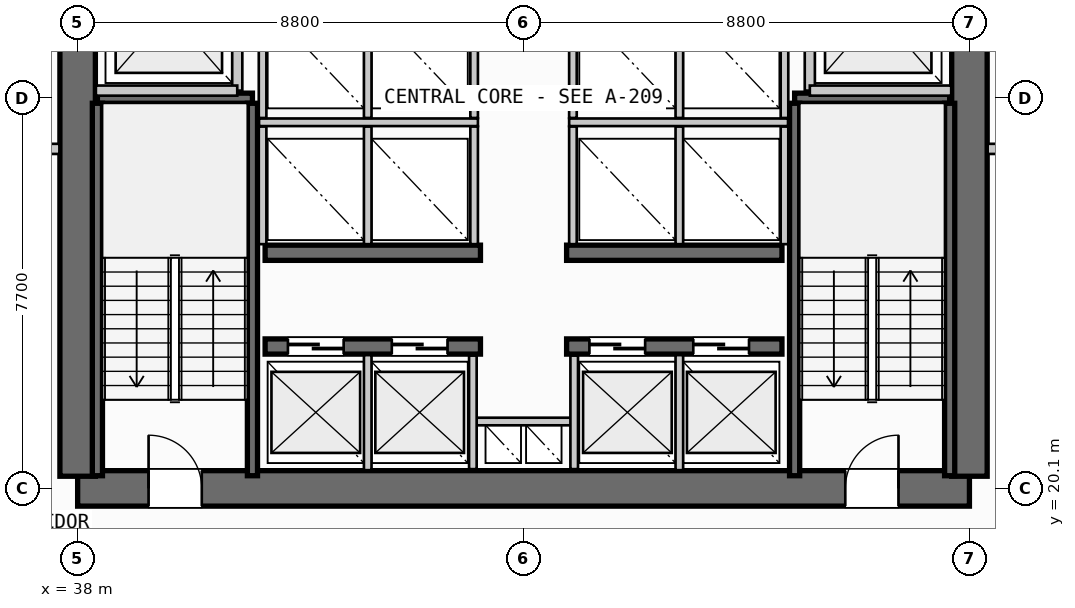
"""IFC4 building model, lengths in metres.
Left out: names, types, materials, properties, quantities, classifications, styles, units other than length and angle.
Written with IfcOpenShell. Run it as: python <this file> out.ifc"""

import sys

from ifc_helpers import new_model, si_unit, direction, frame, frame_2d, origin, place, context, subcontext, project, spatial, rectangle, extrude, source, transform, mapped, element, fill, save


model = new_model("IFC4")
c1 = context("Model", 3, precision=1e-05, world=origin(), true_north=direction((0.0, 1.0)))
c2 = subcontext(c1, "Body", "Model", "MODEL_VIEW")
j1 = project(units=[si_unit("LENGTHUNIT", "METRE"), si_unit("PLANEANGLEUNIT", "RADIAN")], contexts=[c1])
p1 = place(None, origin())
s1 = spatial("IfcSite", under=j1, at=p1, CompositionType="ELEMENT")
p2 = place(p1, origin())
s2 = spatial("IfcBuilding", under=s1, at=p2, CompositionType="ELEMENT")
p3 = place(p2, frame((0.0, 0.0, 60.0)))
s3 = spatial("IfcBuildingStorey", under=s2, at=p3, CompositionType="ELEMENT", Elevation=60.0)
p4 = place(p3, frame((38.0, 20.1, 0.0), z_axis=(0.0, 0.0, 1.0), x_axis=(1.0, 0.0, 0.0)))
e1 = element("IfcWall", 1, at=p4, inside=s3, PredefinedType="SHEAR", context=c2, shape_type="SweptSolid", body=[
    extrude(rectangle(XDim=17.6, YDim=0.7, at=frame_2d((8.8, 0.0))), origin(), (0.0, 0.0, 1.0), 3.55),
])
p5 = place(p4, frame((1.4, 0.0, 0.0)))
e2 = element("IfcOpeningElement", 2, at=p5, cuts=e1, PredefinedType="OPENING", context=c2, shape_type="SweptSolid", body=[
    extrude(rectangle(XDim=1.05, YDim=2.15, at=frame_2d((0.525, 1.075))), frame((0.0, 0.36, 0.0), z_axis=(0.0, -1.0, 0.0), x_axis=(1.0, 0.0, 0.0)), (0.0, 0.0, 1.0), 0.72),
])
p6 = place(p4, frame((15.15, 0.0, 0.0)))
e3 = element("IfcOpeningElement", 3, at=p6, cuts=e1, PredefinedType="OPENING", context=c2, shape_type="SweptSolid", body=[
    extrude(rectangle(XDim=1.05, YDim=2.15, at=frame_2d((0.525, 1.075))), frame((0.0, 0.36, 0.0), z_axis=(0.0, -1.0, 0.0), x_axis=(1.0, 0.0, 0.0)), (0.0, 0.0, 1.0), 0.72),
])
p7 = place(p3, frame((38.0, 35.26, 0.0), z_axis=(0.0, 0.0, 1.0), x_axis=(0.0, -1.0, 0.0)))
e4 = element("IfcWall", 4, at=p7, inside=s3, PredefinedType="SHEAR", context=c2, shape_type="SweptSolid", body=[
    extrude(rectangle(XDim=14.92, YDim=0.7, at=frame_2d((7.46, 0.0))), origin(), (0.0, 0.0, 1.0), 3.55),
])
p8 = place(p7, frame((5.21, 0.0, 0.0)))
e5 = element("IfcOpeningElement", 5, at=p8, cuts=e4, PredefinedType="OPENING", context=c2, shape_type="SweptSolid", body=[
    extrude(rectangle(XDim=1.1, YDim=2.2, at=frame_2d((0.55, 1.1))), frame((0.0, 0.36, 0.0), z_axis=(0.0, -1.0, 0.0), x_axis=(1.0, 0.0, 0.0)), (0.0, 0.0, 1.0), 0.72),
])
p9 = place(p3, frame((55.6, 20.34, 0.0), z_axis=(0.0, 0.0, 1.0), x_axis=(0.0, 1.0, 0.0)))
e6 = element("IfcWall", 6, at=p9, inside=s3, PredefinedType="SHEAR", context=c2, shape_type="SweptSolid", body=[
    extrude(rectangle(XDim=14.92, YDim=0.7, at=frame_2d((7.46, 0.0))), origin(), (0.0, 0.0, 1.0), 3.55),
])
p10 = place(p9, frame((12.71, 0.0, 0.0)))
e7 = element("IfcOpeningElement", 7, at=p10, cuts=e6, PredefinedType="OPENING", context=c2, shape_type="SweptSolid", body=[
    extrude(rectangle(XDim=1.05, YDim=2.15, at=frame_2d((0.525, 1.075))), frame((0.0, 0.36, 0.0), z_axis=(0.0, -1.0, 0.0), x_axis=(1.0, 0.0, 0.0)), (0.0, 0.0, 1.0), 0.72),
])
p11 = place(p9, frame((8.61, 0.0, 0.0)))
e8 = element("IfcOpeningElement", 8, at=p11, cuts=e6, PredefinedType="OPENING", context=c2, shape_type="SweptSolid", body=[
    extrude(rectangle(XDim=1.1, YDim=2.2, at=frame_2d((0.55, 1.1))), frame((0.0, 0.36, 0.0), z_axis=(0.0, -1.0, 0.0), x_axis=(1.0, 0.0, 0.0)), (0.0, 0.0, 1.0), 0.72),
])
p12 = place(p3, frame((41.7, 22.9, 0.0), z_axis=(0.0, 0.0, 1.0), x_axis=(1.0, 0.0, 0.0)))
e9 = element("IfcWall", 9, at=p12, inside=s3, PredefinedType="SHEAR", context=c2, shape_type="SweptSolid", body=[
    extrude(rectangle(XDim=4.25, YDim=0.3, at=frame_2d((2.125, 0.0))), origin(), (0.0, 0.0, 1.0), 3.55),
])
p13 = place(p12, frame((0.45, 0.0, 0.0)))
e10 = element("IfcOpeningElement", 10, at=p13, cuts=e9, PredefinedType="OPENING", context=c2, shape_type="SweptSolid", body=[
    extrude(rectangle(XDim=1.1, YDim=2.2, at=frame_2d((0.55, 1.1))), frame((0.0, 0.16, 0.0), z_axis=(0.0, -1.0, 0.0), x_axis=(1.0, 0.0, 0.0)), (0.0, 0.0, 1.0), 0.32),
])
p14 = place(p12, frame((2.5, 0.0, 0.0)))
e11 = element("IfcOpeningElement", 11, at=p14, cuts=e9, PredefinedType="OPENING", context=c2, shape_type="SweptSolid", body=[
    extrude(rectangle(XDim=1.1, YDim=2.2, at=frame_2d((0.55, 1.1))), frame((0.0, 0.16, 0.0), z_axis=(0.0, -1.0, 0.0), x_axis=(1.0, 0.0, 0.0)), (0.0, 0.0, 1.0), 0.32),
])
p15 = place(p3, frame((47.65, 22.9, 0.0), z_axis=(0.0, 0.0, 1.0), x_axis=(1.0, 0.0, 0.0)))
e12 = element("IfcWall", 12, at=p15, inside=s3, PredefinedType="SHEAR", context=c2, shape_type="SweptSolid", body=[
    extrude(rectangle(XDim=4.25, YDim=0.3, at=frame_2d((2.125, 0.0))), origin(), (0.0, 0.0, 1.0), 3.55),
])
p16 = place(p15, frame((0.45, 0.0, 0.0)))
e13 = element("IfcOpeningElement", 13, at=p16, cuts=e12, PredefinedType="OPENING", context=c2, shape_type="SweptSolid", body=[
    extrude(rectangle(XDim=1.1, YDim=2.2, at=frame_2d((0.55, 1.1))), frame((0.0, 0.16, 0.0), z_axis=(0.0, -1.0, 0.0), x_axis=(1.0, 0.0, 0.0)), (0.0, 0.0, 1.0), 0.32),
])
p17 = place(p15, frame((2.5, 0.0, 0.0)))
e14 = element("IfcOpeningElement", 14, at=p17, cuts=e12, PredefinedType="OPENING", context=c2, shape_type="SweptSolid", body=[
    extrude(rectangle(XDim=1.1, YDim=2.2, at=frame_2d((0.55, 1.1))), frame((0.0, 0.16, 0.0), z_axis=(0.0, -1.0, 0.0), x_axis=(1.0, 0.0, 0.0)), (0.0, 0.0, 1.0), 0.32),
])
for number, where, z_axis, x_axis in (
    (15, (41.7, 24.75, 0.0), (0.0, 0.0, 1.0), (1.0, 0.0, 0.0)),
    (16, (47.65, 24.75, 0.0), (0.0, 0.0, 1.0), (1.0, 0.0, 0.0)),
):
    element("IfcWall", number, at=place(p3, frame(where, z_axis=z_axis, x_axis=x_axis)), inside=s3, PredefinedType="SHEAR", context=c2, shape_type="SweptSolid", body=[
        extrude(rectangle(XDim=4.25, YDim=0.3, at=frame_2d((2.125, 0.0))), origin(), (0.0, 0.0, 1.0), 3.55),
    ])
p18 = place(p3, frame((38.39, 27.8, 0.0), z_axis=(0.0, 0.0, 1.0), x_axis=(1.0, 0.0, 0.0)))
e17 = element("IfcWall", 17, at=p18, inside=s3, PredefinedType="SHEAR", context=c2, shape_type="SweptSolid", body=[
    extrude(rectangle(XDim=3.06, YDim=0.2, at=frame_2d((1.53, 0.0))), origin(), (0.0, 0.0, 1.0), 3.55),
])
for number, where, z_axis, x_axis in (
    (18, (41.45, 27.7, 0.0), (0.0, 0.0, 1.0), (0.0, -1.0, 0.0)),
    (19, (38.39, 20.35, 0.0), (0.0, 0.0, 1.0), (0.0, 1.0, 0.0)),
):
    element("IfcWall", number, at=place(p3, frame(where, z_axis=z_axis, x_axis=x_axis)), inside=s3, PredefinedType="SHEAR", context=c2, shape_type="SweptSolid", body=[
        extrude(rectangle(XDim=7.35, YDim=0.2, at=frame_2d((3.675, 0.0))), origin(), (0.0, 0.0, 1.0), 3.55),
    ])
p19 = place(p3, frame((52.15, 27.8, 0.0), z_axis=(0.0, 0.0, 1.0), x_axis=(1.0, 0.0, 0.0)))
e20 = element("IfcWall", 20, at=p19, inside=s3, PredefinedType="SHEAR", context=c2, shape_type="SweptSolid", body=[
    extrude(rectangle(XDim=3.06, YDim=0.2, at=frame_2d((1.53, 0.0))), origin(), (0.0, 0.0, 1.0), 3.55),
])
for number, where, z_axis, x_axis in (
    (21, (55.21, 27.7, 0.0), (0.0, 0.0, 1.0), (0.0, -1.0, 0.0)),
    (22, (52.15, 20.35, 0.0), (0.0, 0.0, 1.0), (0.0, 1.0, 0.0)),
):
    element("IfcWall", number, at=place(p3, frame(where, z_axis=z_axis, x_axis=x_axis)), inside=s3, PredefinedType="SHEAR", context=c2, shape_type="SweptSolid", body=[
        extrude(rectangle(XDim=7.35, YDim=0.2, at=frame_2d((3.675, 0.0))), origin(), (0.0, 0.0, 1.0), 3.55),
    ])
p20 = place(p3, frame((45.8, 21.42, 0.0), z_axis=(0.0, 0.0, 1.0), x_axis=(1.0, 0.0, 0.0)))
e23 = element("IfcWall", 23, at=p20, inside=s3, PredefinedType="PARTITIONING", context=c2, shape_type="SweptSolid", body=[
    extrude(rectangle(XDim=2.0, YDim=0.15, at=frame_2d((1.0, 0.0))), origin(), (0.0, 0.0, 1.0), 2.645),
])
for number, where, z_axis, x_axis in (
    (24, (45.8, 20.48, 0.0), (0.0, 0.0, 1.0), (0.0, 1.0, 0.0)),
    (25, (47.8, 20.48, 0.0), (0.0, 0.0, 1.0), (0.0, 1.0, 0.0)),
):
    element("IfcWall", number, at=place(p3, frame(where, z_axis=z_axis, x_axis=x_axis)), inside=s3, PredefinedType="PARTITIONING", context=c2, shape_type="SweptSolid", body=[
        extrude(rectangle(XDim=2.24, YDim=0.15, at=frame_2d((1.12, 0.0))), origin(), (0.0, 0.0, 1.0), 2.645),
    ])
p21 = place(p3, frame((41.15, 27.95, 0.0), z_axis=(0.0, 0.0, 1.0), x_axis=(0.0, 1.0, 0.0)))
e26 = element("IfcWall", 26, at=p21, inside=s3, PredefinedType="PARTITIONING", context=c2, shape_type="SweptSolid", body=[
    extrude(rectangle(XDim=3.1, YDim=0.2, at=frame_2d((1.55, 0.0))), origin(), (0.0, 0.0, 1.0), 2.645),
])
p22 = place(p3, frame((38.36, 27.95, 0.0), z_axis=(0.0, 0.0, 1.0), x_axis=(1.0, 0.0, 0.0)))
e27 = element("IfcWall", 27, at=p22, inside=s3, PredefinedType="PARTITIONING", context=c2, shape_type="SweptSolid", body=[
    extrude(rectangle(XDim=2.79, YDim=0.2, at=frame_2d((1.395, 0.0))), origin(), (0.0, 0.0, 1.0), 2.645),
])
p23 = place(p3, frame((34.5, 26.8, 0.0), z_axis=(0.0, 0.0, 1.0), x_axis=(1.0, 0.0, 0.0)))
e28 = element("IfcWall", 28, at=p23, inside=s3, PredefinedType="PARTITIONING", context=c2, shape_type="SweptSolid", body=[
    extrude(rectangle(XDim=3.14, YDim=0.2, at=frame_2d((1.57, 0.0))), origin(), (0.0, 0.0, 1.0), 2.645),
])
p24 = place(p3, frame((52.45, 27.95, 0.0), z_axis=(0.0, 0.0, 1.0), x_axis=(0.0, 1.0, 0.0)))
e29 = element("IfcWall", 29, at=p24, inside=s3, PredefinedType="PARTITIONING", context=c2, shape_type="SweptSolid", body=[
    extrude(rectangle(XDim=3.1, YDim=0.2, at=frame_2d((1.55, 0.0))), origin(), (0.0, 0.0, 1.0), 2.645),
])
p25 = place(p3, frame((52.45, 27.95, 0.0), z_axis=(0.0, 0.0, 1.0), x_axis=(1.0, 0.0, 0.0)))
e30 = element("IfcWall", 30, at=p25, inside=s3, PredefinedType="PARTITIONING", context=c2, shape_type="SweptSolid", body=[
    extrude(rectangle(XDim=2.79, YDim=0.2, at=frame_2d((1.395, 0.0))), origin(), (0.0, 0.0, 1.0), 2.645),
])
p26 = place(p3, frame((55.96, 26.8, 0.0), z_axis=(0.0, 0.0, 1.0), x_axis=(1.0, 0.0, 0.0)))
e31 = element("IfcWall", 31, at=p26, inside=s3, PredefinedType="PARTITIONING", context=c2, shape_type="SweptSolid", body=[
    extrude(rectangle(XDim=3.14, YDim=0.2, at=frame_2d((1.57, 0.0))), origin(), (0.0, 0.0, 1.0), 2.645),
])
for number, where, z_axis, x_axis in (
    (32, (43.725, 20.46, 0.0), (0.0, 0.0, 1.0), (0.0, 1.0, 0.0)),
    (33, (49.875, 20.46, 0.0), (0.0, 0.0, 1.0), (0.0, 1.0, 0.0)),
):
    element("IfcWall", number, at=place(p3, frame(where, z_axis=z_axis, x_axis=x_axis)), inside=s3, PredefinedType="PARTITIONING", context=c2, shape_type="SweptSolid", body=[
        extrude(rectangle(XDim=2.27, YDim=0.15, at=frame_2d((1.135, 0.0))), origin(), (0.0, 0.0, 1.0), 2.645),
    ])
p27 = place(p3, frame((41.58, 27.325, 0.0), z_axis=(0.0, 0.0, 1.0), x_axis=(1.0, 0.0, 0.0)))
e34 = element("IfcWall", 34, at=p27, inside=s3, PredefinedType="PARTITIONING", context=c2, shape_type="SweptSolid", body=[
    extrude(rectangle(XDim=4.32, YDim=0.15, at=frame_2d((2.16, 0.0))), origin(), (0.0, 0.0, 1.0), 2.645),
])
p28 = place(p3, frame((47.7, 27.325, 0.0), z_axis=(0.0, 0.0, 1.0), x_axis=(1.0, 0.0, 0.0)))
e35 = element("IfcWall", 35, at=p28, inside=s3, PredefinedType="PARTITIONING", context=c2, shape_type="SweptSolid", body=[
    extrude(rectangle(XDim=4.32, YDim=0.15, at=frame_2d((2.16, 0.0))), origin(), (0.0, 0.0, 1.0), 2.645),
])
for number, where, z_axis, x_axis in (
    (36, (41.65, 24.92, 0.0), (0.0, 0.0, 1.0), (0.0, 1.0, 0.0)),
    (37, (43.725, 24.92, 0.0), (0.0, 0.0, 1.0), (0.0, 1.0, 0.0)),
    (38, (45.825, 24.92, 0.0), (0.0, 0.0, 1.0), (0.0, 1.0, 0.0)),
    (39, (47.775, 24.92, 0.0), (0.0, 0.0, 1.0), (0.0, 1.0, 0.0)),
    (40, (49.875, 24.92, 0.0), (0.0, 0.0, 1.0), (0.0, 1.0, 0.0)),
    (41, (51.95, 24.92, 0.0), (0.0, 0.0, 1.0), (0.0, 1.0, 0.0)),
):
    element("IfcWall", number, at=place(p3, frame(where, z_axis=z_axis, x_axis=x_axis)), inside=s3, PredefinedType="PARTITIONING", context=c2, shape_type="SweptSolid", body=[
        extrude(rectangle(XDim=2.32, YDim=0.15, at=frame_2d((1.16, 0.0))), origin(), (0.0, 0.0, 1.0), 2.645),
    ])
for number, where, z_axis, x_axis in (
    (42, (41.65, 27.41, 0.0), (0.0, 0.0, 1.0), (0.0, 1.0, 0.0)),
    (43, (43.725, 27.41, 0.0), (0.0, 0.0, 1.0), (0.0, 1.0, 0.0)),
    (44, (45.825, 27.41, 0.0), (0.0, 0.0, 1.0), (0.0, 1.0, 0.0)),
    (45, (47.775, 27.41, 0.0), (0.0, 0.0, 1.0), (0.0, 1.0, 0.0)),
    (46, (49.875, 27.41, 0.0), (0.0, 0.0, 1.0), (0.0, 1.0, 0.0)),
    (47, (51.95, 27.41, 0.0), (0.0, 0.0, 1.0), (0.0, 1.0, 0.0)),
):
    element("IfcWall", number, at=place(p3, frame(where, z_axis=z_axis, x_axis=x_axis)), inside=s3, PredefinedType="PARTITIONING", context=c2, shape_type="SweptSolid", body=[
        extrude(rectangle(XDim=2.27, YDim=0.15, at=frame_2d((1.135, 0.0))), origin(), (0.0, 0.0, 1.0), 2.645),
    ])
m1 = source(origin(), c2, "Body", "SweptSolid", [
    extrude(rectangle(XDim=1.05, YDim=2.15, at=frame_2d((0.525, 1.075))), frame((0.0, 0.025, 0.0), z_axis=(0.0, -1.0, 0.0), x_axis=(1.0, 0.0, 0.0)), (0.0, 0.0, 1.0), 0.05),
])
p29 = place(p5, origin())
e48 = element("IfcDoor", 48, at=p29, inside=s3, OperationType="SINGLE_SWING_LEFT", PredefinedType="DOOR", context=c2, shape_type="MappedRepresentation", body=[
    mapped(m1, transform((0.0, 0.0, 0.0), scale=1.0)),
])
fill(e2, e48)
p30 = place(p6, origin())
e49 = element("IfcDoor", 49, at=p30, inside=s3, OperationType="SINGLE_SWING_RIGHT", PredefinedType="DOOR", context=c2, shape_type="MappedRepresentation", body=[
    mapped(m1, transform((0.0, 0.0, 0.0), scale=1.0)),
])
fill(e3, e49)
m2 = source(origin(), c2, "Body", "SweptSolid", [
    extrude(rectangle(XDim=1.1, YDim=2.2, at=frame_2d((0.55, 1.1))), frame((0.0, 0.025, 0.0), z_axis=(0.0, -1.0, 0.0), x_axis=(1.0, 0.0, 0.0)), (0.0, 0.0, 1.0), 0.05),
])
p31 = place(p13, origin())
e50 = element("IfcDoor", 50, at=p31, inside=s3, OperationType="SLIDING_TO_LEFT", PredefinedType="DOOR", context=c2, shape_type="MappedRepresentation", body=[
    mapped(m2, transform((0.0, 0.0, 0.0), scale=1.0)),
])
fill(e10, e50)
p32 = place(p14, origin())
e51 = element("IfcDoor", 51, at=p32, inside=s3, OperationType="SLIDING_TO_LEFT", PredefinedType="DOOR", context=c2, shape_type="MappedRepresentation", body=[
    mapped(m2, transform((0.0, 0.0, 0.0), scale=1.0)),
])
fill(e11, e51)
p33 = place(p16, origin())
e52 = element("IfcDoor", 52, at=p33, inside=s3, OperationType="SLIDING_TO_LEFT", PredefinedType="DOOR", context=c2, shape_type="MappedRepresentation", body=[
    mapped(m2, transform((0.0, 0.0, 0.0), scale=1.0)),
])
fill(e13, e52)
p34 = place(p17, origin())
e53 = element("IfcDoor", 53, at=p34, inside=s3, OperationType="SLIDING_TO_LEFT", PredefinedType="DOOR", context=c2, shape_type="MappedRepresentation", body=[
    mapped(m2, transform((0.0, 0.0, 0.0), scale=1.0)),
])
fill(e14, e53)
save(model, sys.argv[1])
